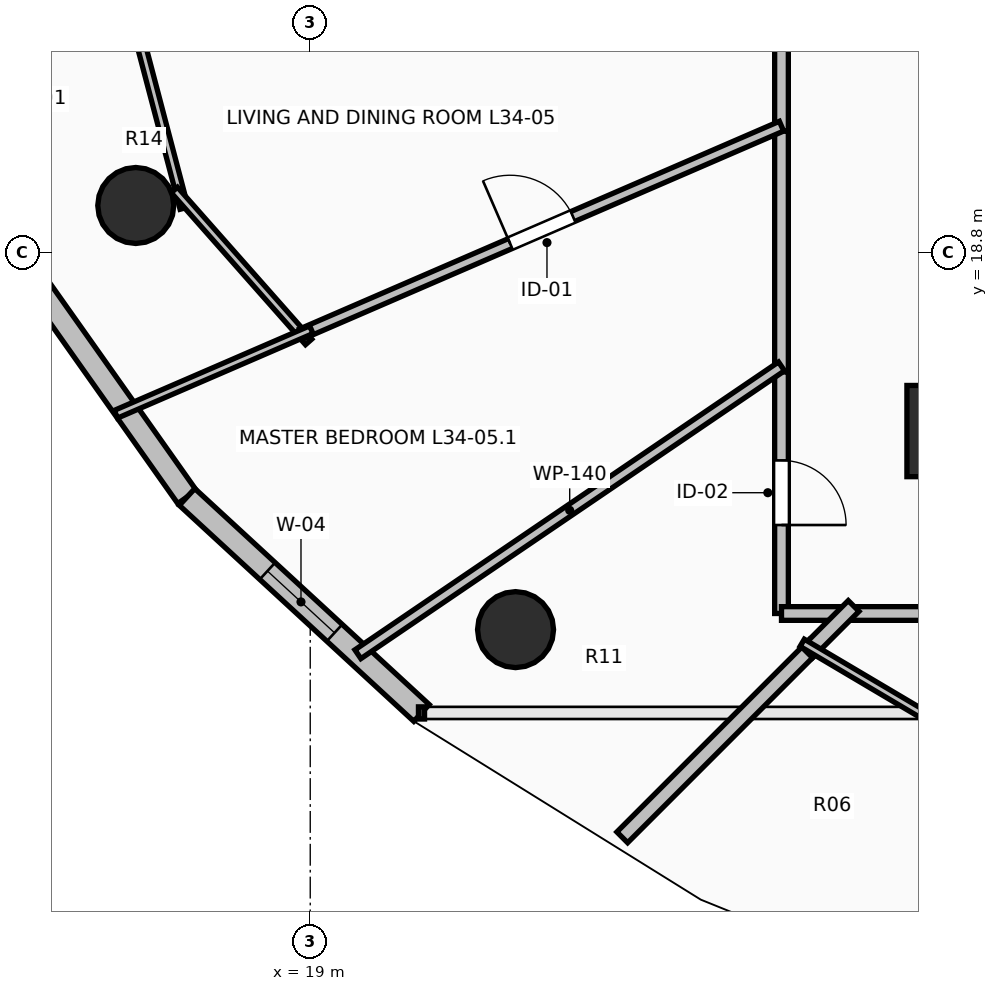
"""IFC4 building model, lengths in metres.
Left out: names, types, materials, properties, quantities, classifications, styles, units other than length and angle.
Written with IfcOpenShell. Run it as: python <this file> out.ifc"""

import sys

from ifc_helpers import new_model, si_unit, direction, frame, frame_2d, origin, origin_2d, place, context, subcontext, project, spatial, rectangle, circle, extrude, element, fill, save


model = new_model("IFC4")
c1 = context("Model", 3, precision=1e-05, world=origin(), true_north=direction((0.0, 1.0)))
c2 = subcontext(c1, "Body", "Model", "MODEL_VIEW")
j1 = project(units=[si_unit("LENGTHUNIT", "METRE"), si_unit("PLANEANGLEUNIT", "RADIAN")], contexts=[c1])
p1 = place(None, origin())
s1 = spatial("IfcSite", under=j1, at=p1, CompositionType="ELEMENT")
p2 = place(p1, origin())
s2 = spatial("IfcBuilding", under=s1, at=p2, CompositionType="ELEMENT")
p3 = place(p2, frame((0.0, 0.0, 129.1)))
s3 = spatial("IfcBuildingStorey", under=s2, at=p3, CompositionType="ELEMENT", Elevation=129.1)
for number, where, z_axis, x_axis in (
    (1, (16.705, 19.418, 0.0), (0.0, 0.0, 1.0), (-0.924, -0.383, 0.0)),
    (2, (21.701, 13.838, 0.0), (0.0, 0.0, 1.0), (-0.707, -0.707, 0.0)),
):
    element("IfcColumn", number, at=place(p3, frame(where, z_axis=z_axis, x_axis=x_axis)), inside=s3, PredefinedType="COLUMN", context=c2, shape_type="SweptSolid", body=[
        extrude(circle(Radius=0.5, at=origin_2d()), origin(), (0.0, 0.0, 1.0), 3.5),
    ])
p4 = place(p3, frame((27.25, 16.45, 0.0), z_axis=(0.0, 0.0, 1.0), x_axis=(1.0, 0.0, 0.0)))
e3 = element("IfcColumn", 3, at=p4, inside=s3, PredefinedType="PILASTER", context=c2, shape_type="SweptSolid", body=[
    extrude(rectangle(XDim=0.8, YDim=1.2, at=origin_2d()), origin(), (0.0, 0.0, 1.0), 3.5),
])
p5 = place(p3, frame((15.088, 18.825, 0.0), z_axis=(0.0, 0.0, 1.0), x_axis=(0.577269753207, -0.816553508371, 0.0)))
e4 = element("IfcWall", 4, at=p5, inside=s3, PredefinedType="STANDARD", context=c2, shape_type="SweptSolid", body=[
    extrude(rectangle(XDim=3.97, YDim=0.3, at=frame_2d((1.985, 0.0))), origin(), (0.0, 0.0, 1.0), 3.24),
])
p6 = place(p3, frame((17.38, 15.583, 0.0), z_axis=(0.0, 0.0, 1.0), x_axis=(0.735477154165, -0.677549522693, 0.0)))
e5 = element("IfcWall", 5, at=p6, inside=s3, PredefinedType="STANDARD", context=c2, shape_type="SweptSolid", body=[
    extrude(rectangle(XDim=4.194, YDim=0.3, at=frame_2d((2.097, 0.0))), origin(), (0.0, 0.0, 1.0), 3.24),
])
p7 = place(p6, frame((1.438, 0.0, 0.85)))
e6 = element("IfcOpeningElement", 6, at=p7, cuts=e5, PredefinedType="OPENING", context=c2, shape_type="SweptSolid", body=[
    extrude(rectangle(XDim=1.2, YDim=1.95, at=frame_2d((0.6, 0.975))), frame((0.0, 0.165, 0.0), z_axis=(0.0, -1.0, 0.0), x_axis=(1.0, 0.0, 0.0)), (0.0, 0.0, 1.0), 0.33),
])
p8 = place(p3, frame((25.2, 23.735, 0.0), z_axis=(0.0, 0.0, 1.0), x_axis=(0.0, -1.0, 0.0)))
e7 = element("IfcWall", 7, at=p8, inside=s3, PredefinedType="PARTITIONING", context=c2, shape_type="SweptSolid", body=[
    extrude(rectangle(XDim=3.339, YDim=0.18, at=frame_2d((1.669, 0.0))), origin(), (0.0, 0.0, 1.0), 3.24),
])
p9 = place(p3, frame((25.2, 20.396, 0.0), z_axis=(0.0, 0.0, 1.0), x_axis=(0.0, -1.0, 0.0)))
e8 = element("IfcWall", 8, at=p9, inside=s3, PredefinedType="PARTITIONING", context=c2, shape_type="SweptSolid", body=[
    extrude(rectangle(XDim=3.168, YDim=0.18, at=frame_2d((1.584, 0.0))), origin(), (0.0, 0.0, 1.0), 2.432),
])
p10 = place(p3, frame((25.2, 17.228, 0.0), z_axis=(0.0, 0.0, 1.0), x_axis=(0.0, -1.0, 0.0)))
e9 = element("IfcWall", 9, at=p10, inside=s3, PredefinedType="PARTITIONING", context=c2, shape_type="SweptSolid", body=[
    extrude(rectangle(XDim=3.178, YDim=0.18, at=frame_2d((1.589, 0.0))), origin(), (0.0, 0.0, 1.0), 2.432),
])
p11 = place(p10, frame((1.164, 0.0, 0.0)))
e10 = element("IfcOpeningElement", 10, at=p11, cuts=e9, PredefinedType="OPENING", context=c2, shape_type="SweptSolid", body=[
    extrude(rectangle(XDim=0.85, YDim=2.1, at=frame_2d((0.425, 1.05))), frame((0.0, 0.105, 0.0), z_axis=(0.0, -1.0, 0.0), x_axis=(1.0, 0.0, 0.0)), (0.0, 0.0, 1.0), 0.21),
])
p12 = place(p3, frame((25.2, 14.05, 0.0), z_axis=(0.0, 0.0, 1.0), x_axis=(1.0, 0.0, 0.0)))
e11 = element("IfcWall", 11, at=p12, inside=s3, PredefinedType="PARTITIONING", context=c2, shape_type="SweptSolid", body=[
    extrude(rectangle(XDim=0.91, YDim=0.18, at=frame_2d((0.455, 0.0))), origin(), (0.0, 0.0, 1.0), 2.874),
])
p13 = place(p3, frame((25.97, 14.05, 0.0), z_axis=(0.0, 0.0, 1.0), x_axis=(1.0, 0.0, 0.0)))
e12 = element("IfcWall", 12, at=p13, inside=s3, PredefinedType="PARTITIONING", context=c2, shape_type="SweptSolid", body=[
    extrude(rectangle(XDim=3.821, YDim=0.18, at=frame_2d((1.911, 0.0))), origin(), (0.0, 0.0, 1.0), 2.432),
])
p14 = place(p3, frame((13.977, 21.23, 0.0), z_axis=(0.0, 0.0, 1.0), x_axis=(0.980903189798, 0.194496612425, 0.0)))
e13 = element("IfcWall", 13, at=p14, inside=s3, PredefinedType="PARTITIONING", context=c2, shape_type="SweptSolid", body=[
    extrude(rectangle(XDim=2.928, YDim=0.11, at=frame_2d((1.464, 0.0))), origin(), (0.0, 0.0, 1.0), 2.728),
])
p15 = place(p14, frame((1.014, 0.0, 0.0)))
e14 = element("IfcOpeningElement", 14, at=p15, cuts=e13, PredefinedType="OPENING", context=c2, shape_type="SweptSolid", body=[
    extrude(rectangle(XDim=0.9, YDim=2.1, at=frame_2d((0.45, 1.05))), frame((0.0, 0.07, 0.0), z_axis=(0.0, -1.0, 0.0), x_axis=(1.0, 0.0, 0.0)), (0.0, 0.0, 1.0), 0.14),
])
p16 = place(p3, frame((16.677, 21.907, 0.0), z_axis=(0.0, 0.0, 1.0), x_axis=(0.254263226868, -0.967135053373, 0.0)))
e15 = element("IfcWall", 15, at=p16, inside=s3, PredefinedType="PARTITIONING", context=c2, shape_type="SweptSolid", body=[
    extrude(rectangle(XDim=2.612, YDim=0.11, at=frame_2d((1.306, 0.0))), origin(), (0.0, 0.0, 1.0), 2.432),
])
p17 = place(p3, frame((17.212, 19.622, 0.0), z_axis=(0.0, 0.0, 1.0), x_axis=(0.662196601313, -0.749330141666, 0.0)))
e16 = element("IfcWall", 16, at=p17, inside=s3, PredefinedType="PARTITIONING", context=c2, shape_type="SweptSolid", body=[
    extrude(rectangle(XDim=2.667, YDim=0.11, at=frame_2d((1.334, 0.0))), origin(), (0.0, 0.0, 1.0), 2.432),
])
p18 = place(p3, frame((18.886, 17.728, 0.0), z_axis=(0.0, 0.0, 1.0), x_axis=(0.917722116807, 0.397223005782, 0.0)))
e17 = element("IfcWall", 17, at=p18, inside=s3, PredefinedType="PARTITIONING", context=c2, shape_type="SweptSolid", body=[
    extrude(rectangle(XDim=6.88, YDim=0.14, at=frame_2d((3.44, 0.0))), origin(), (0.0, 0.0, 1.0), 2.432),
])
p19 = place(p18, frame((2.99, 0.0, 0.0)))
e18 = element("IfcOpeningElement", 18, at=p19, cuts=e17, PredefinedType="OPENING", context=c2, shape_type="SweptSolid", body=[
    extrude(rectangle(XDim=0.9, YDim=2.1, at=frame_2d((0.45, 1.05))), frame((0.0, 0.085, 0.0), z_axis=(0.0, -1.0, 0.0), x_axis=(1.0, 0.0, 0.0)), (0.0, 0.0, 1.0), 0.17),
])
p20 = place(p3, frame((16.444, 16.671, 0.0), z_axis=(0.0, 0.0, 1.0), x_axis=(0.91777806569, 0.39709371959, 0.0)))
e19 = element("IfcWall", 19, at=p20, inside=s3, PredefinedType="PARTITIONING", context=c2, shape_type="SweptSolid", body=[
    extrude(rectangle(XDim=2.801, YDim=0.11, at=frame_2d((1.4, 0.0))), origin(), (0.0, 0.0, 1.0), 2.728),
])
p21 = place(p3, frame((19.627, 13.514, 0.0), z_axis=(0.0, 0.0, 1.0), x_axis=(0.827101009155, 0.562053307663, 0.0)))
e20 = element("IfcWall", 20, at=p21, inside=s3, PredefinedType="PARTITIONING", context=c2, shape_type="SweptSolid", body=[
    extrude(rectangle(XDim=6.738, YDim=0.14, at=frame_2d((3.369, 0.0))), origin(), (0.0, 0.0, 1.0), 2.432),
])
p22 = place(p3, frame((23.105, 11.105, 0.0), z_axis=(0.0, 0.0, 1.0), x_axis=(0.707106781187, 0.707106781187, 0.0)))
e21 = element("IfcWall", 21, at=p22, inside=s3, PredefinedType="PARTITIONING", context=c2, shape_type="SweptSolid", body=[
    extrude(rectangle(XDim=3.581, YDim=0.2, at=frame_2d((1.791, 0.0))), origin(), (0.0, 0.0, 1.0), 2.728),
])
p23 = place(p3, frame((25.538, 13.538, 0.0), z_axis=(0.0, 0.0, 1.0), x_axis=(0.707106781187, 0.707106781187, 0.0)))
e22 = element("IfcWall", 22, at=p23, inside=s3, PredefinedType="PARTITIONING", context=c2, shape_type="SweptSolid", body=[
    extrude(rectangle(XDim=0.864, YDim=0.2, at=frame_2d((0.432, 0.0))), origin(), (0.0, 0.0, 1.0), 2.874),
])
p24 = place(p3, frame((27.611, 12.399, 0.0), z_axis=(0.0, 0.0, 1.0), x_axis=(-0.860546797705, 0.509371386082, 0.0)))
e23 = element("IfcWall", 23, at=p24, inside=s3, PredefinedType="PARTITIONING", context=c2, shape_type="SweptSolid", body=[
    extrude(rectangle(XDim=2.485, YDim=0.11, at=frame_2d((1.242, 0.0))), origin(), (0.0, 0.0, 1.0), 2.874),
])
p25 = place(p3, frame((26.785, 9.228, 0.0), z_axis=(0.0, 0.0, 1.0), x_axis=(0.555802936367, 0.831314077786, 0.0)))
e24 = element("IfcWall", 24, at=p25, inside=s3, PredefinedType="PARTITIONING", context=c2, shape_type="SweptSolid", body=[
    extrude(rectangle(XDim=2.349, YDim=0.11, at=frame_2d((1.175, 0.0))), origin(), (0.0, 0.0, 1.0), 2.728),
])
p26 = place(p7, origin())
e25 = element("IfcWindow", 25, at=p26, inside=s3, PartitioningType="SINGLE_PANEL", PredefinedType="WINDOW", context=c2, shape_type="SweptSolid", body=[
    extrude(rectangle(XDim=1.2, YDim=1.95, at=frame_2d((0.6, 0.975))), frame((0.0, 0.03, 0.0), z_axis=(0.0, -1.0, 0.0), x_axis=(1.0, 0.0, 0.0)), (0.0, 0.0, 1.0), 0.06),
])
fill(e6, e25)
p27 = place(p15, origin())
e26 = element("IfcDoor", 26, at=p27, inside=s3, OperationType="SINGLE_SWING_RIGHT", PredefinedType="DOOR", context=c2, shape_type="SweptSolid", body=[
    extrude(rectangle(XDim=0.9, YDim=2.1, at=frame_2d((0.45, 1.05))), frame((0.0, 0.025, 0.0), z_axis=(0.0, -1.0, 0.0), x_axis=(1.0, 0.0, 0.0)), (0.0, 0.0, 1.0), 0.05),
])
fill(e14, e26)
p28 = place(p19, origin())
e27 = element("IfcDoor", 27, at=p28, inside=s3, OperationType="SINGLE_SWING_LEFT", PredefinedType="DOOR", context=c2, shape_type="SweptSolid", body=[
    extrude(rectangle(XDim=0.9, YDim=2.1, at=frame_2d((0.45, 1.05))), frame((0.0, 0.025, 0.0), z_axis=(0.0, -1.0, 0.0), x_axis=(1.0, 0.0, 0.0)), (0.0, 0.0, 1.0), 0.05),
])
fill(e18, e27)
p29 = place(p11, origin())
e28 = element("IfcDoor", 28, at=p29, inside=s3, OperationType="SINGLE_SWING_RIGHT", PredefinedType="DOOR", context=c2, shape_type="SweptSolid", body=[
    extrude(rectangle(XDim=0.85, YDim=2.1, at=frame_2d((0.425, 1.05))), frame((0.0, 0.025, 0.0), z_axis=(0.0, -1.0, 0.0), x_axis=(1.0, 0.0, 0.0)), (0.0, 0.0, 1.0), 0.05),
])
fill(e10, e28)
save(model, sys.argv[1])
